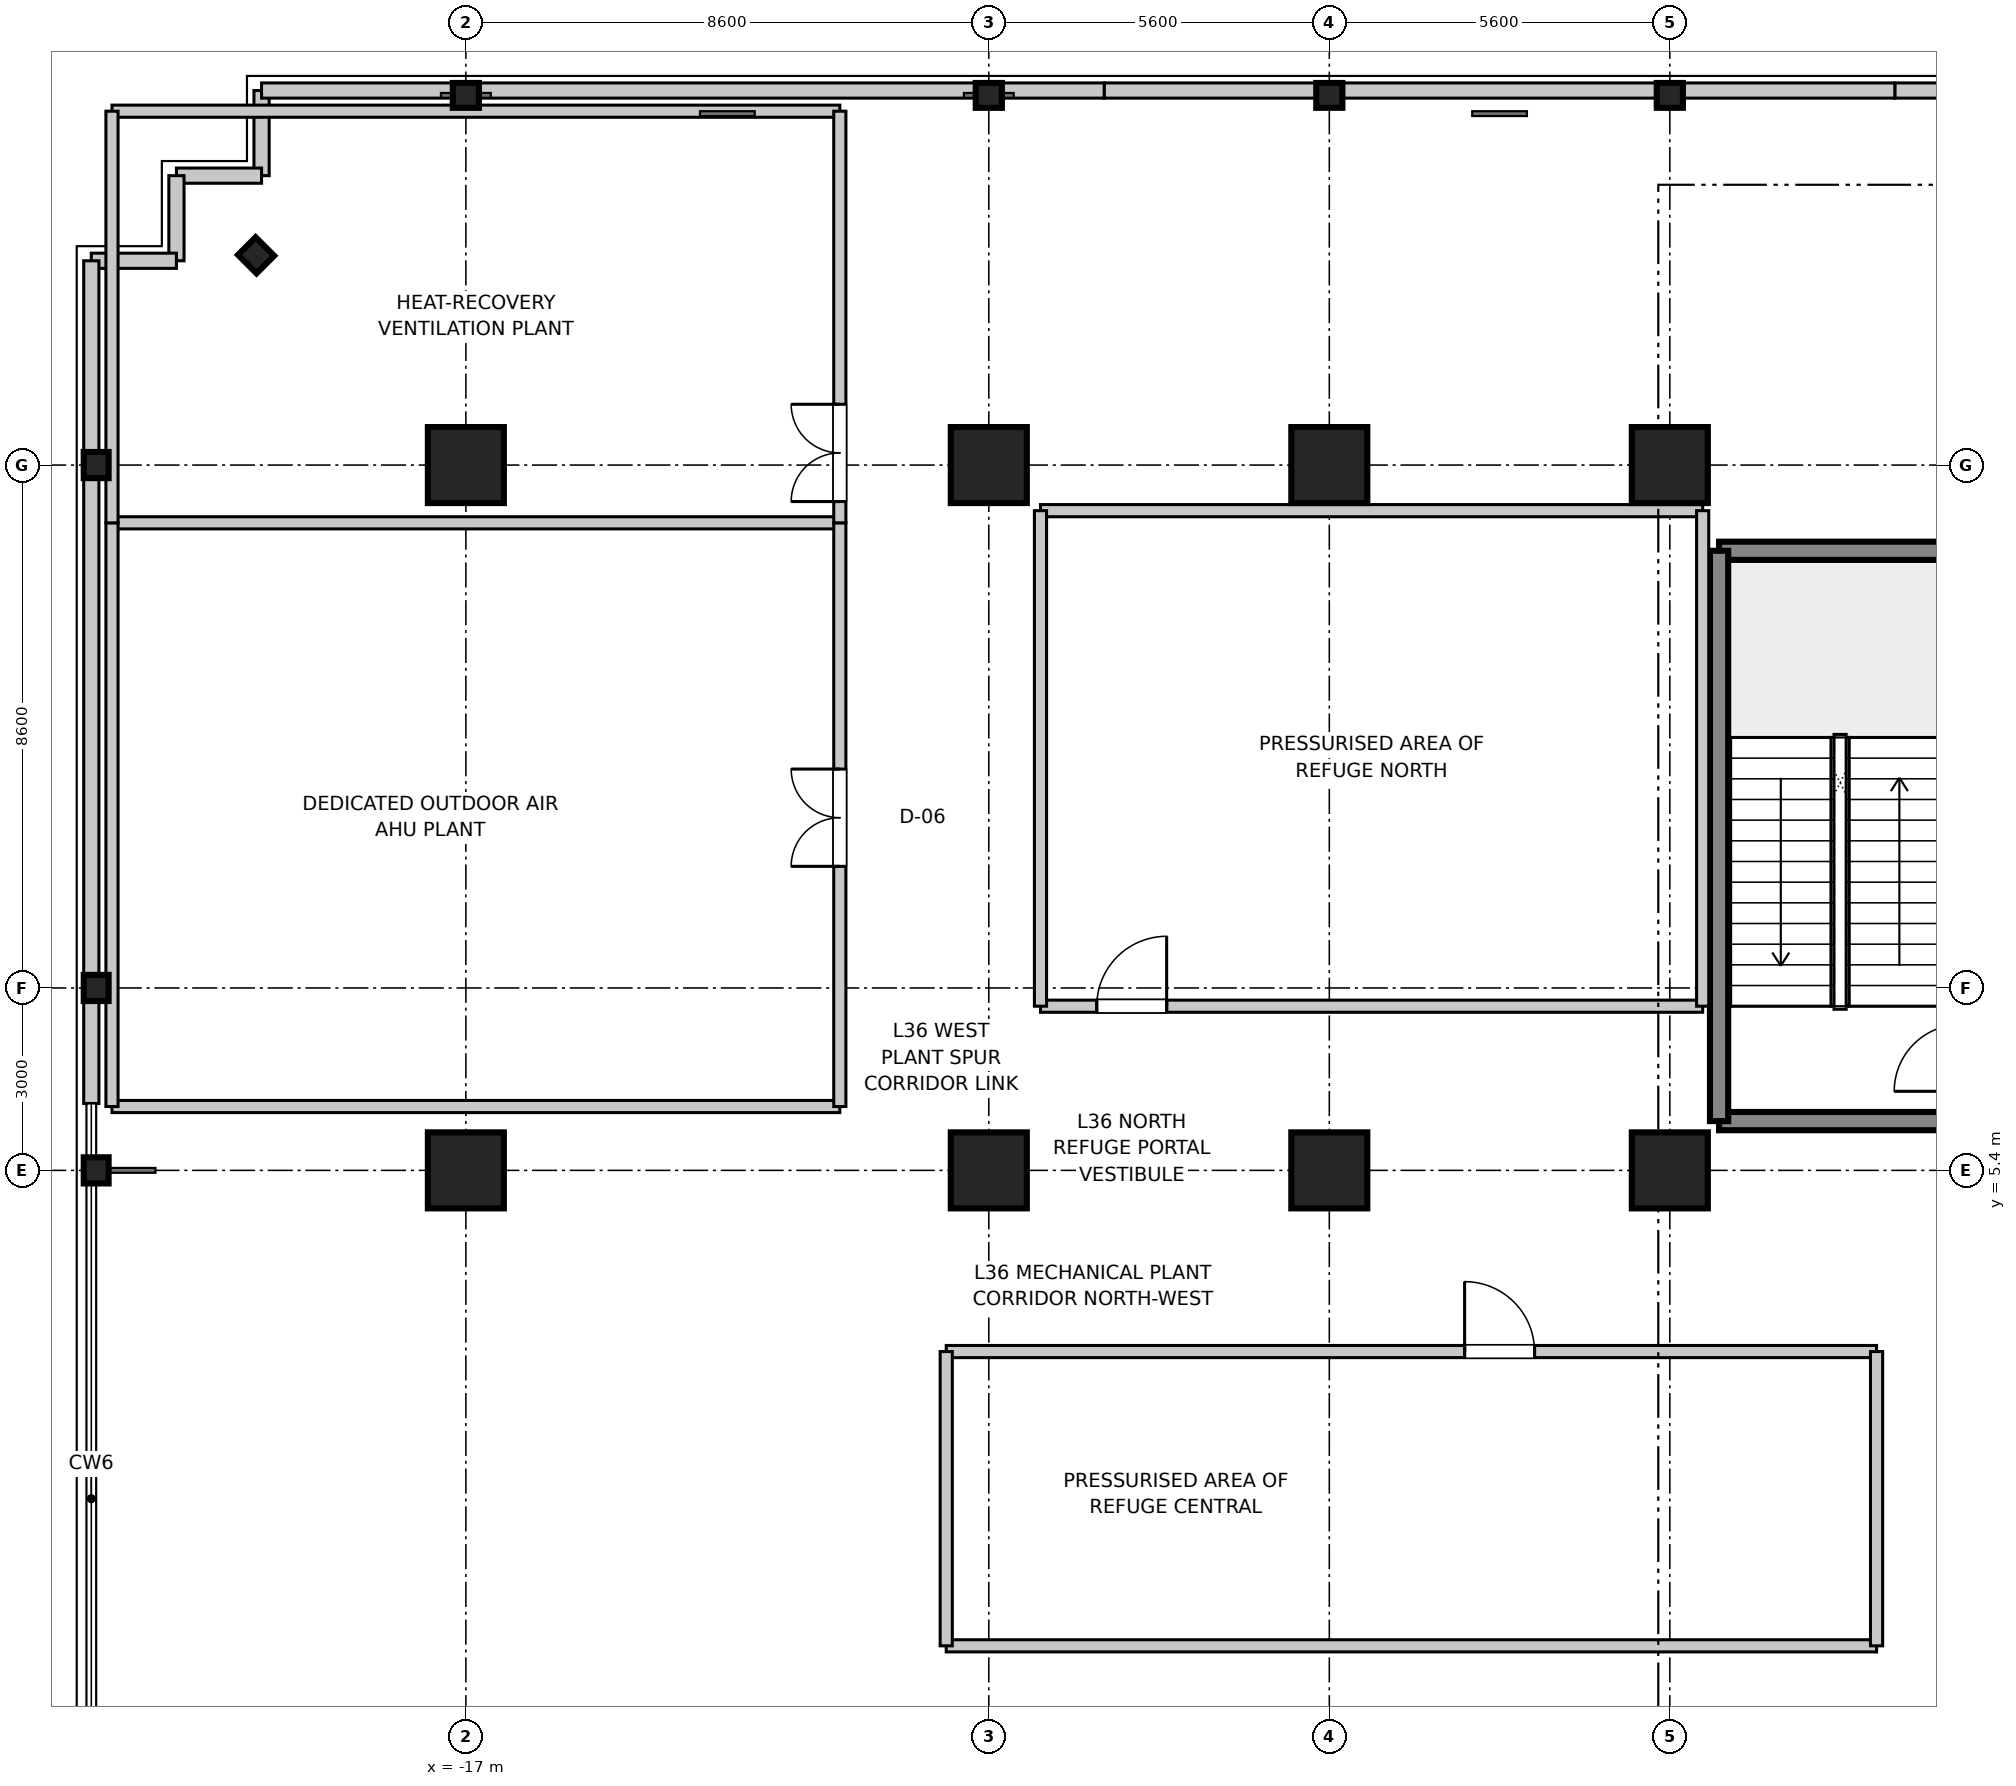
"""IFC4 building model, lengths in metres.
Left out: names, types, materials, properties, quantities, classifications, styles, units other than length and angle.
Written with IfcOpenShell. Run it as: python <this file> out.ifc"""

import sys

from ifc_helpers import new_model, si_unit, direction, frame, frame_2d, origin, origin_2d, place, context, subcontext, project, spatial, rectangle, i_section, extrude, source, transform, mapped, element, fill, save


model = new_model("IFC4")
c1 = context("Model", 3, precision=1e-05, world=origin(), true_north=direction((0.0, 1.0)))
c2 = subcontext(c1, "Body", "Model", "MODEL_VIEW")
j1 = project(units=[si_unit("LENGTHUNIT", "METRE"), si_unit("PLANEANGLEUNIT", "RADIAN")], contexts=[c1])
p1 = place(None, origin())
s1 = spatial("IfcSite", under=j1, at=p1, CompositionType="ELEMENT")
p2 = place(p1, origin())
s2 = spatial("IfcBuilding", under=s1, at=p2, CompositionType="ELEMENT")
p3 = place(p2, frame((0.0, 0.0, 144.2)))
s3 = spatial("IfcBuildingStorey", under=s2, at=p3, CompositionType="ELEMENT", Elevation=144.2)
m1 = source(origin(), c2, "Body", "SweptSolid", [
    extrude(rectangle(XDim=1.25, YDim=1.25, at=origin_2d()), origin(), (0.0, 0.0, 1.0), 4.755),
])
for number, where, z_axis, x_axis in (
    (1, (-17.0, 5.4, 0.0), (0.0, 0.0, 1.0), (1.0, 0.0, 0.0)),
    (2, (-17.0, 17.0, 0.0), (0.0, 0.0, 1.0), (1.0, 0.0, 0.0)),
    (3, (-8.4, 5.4, 0.0), (0.0, 0.0, 1.0), (1.0, 0.0, 0.0)),
    (4, (-8.4, 17.0, 0.0), (0.0, 0.0, 1.0), (1.0, 0.0, 0.0)),
    (5, (-2.8, 5.4, 0.0), (0.0, 0.0, 1.0), (1.0, 0.0, 0.0)),
    (6, (-2.8, 17.0, 0.0), (0.0, 0.0, 1.0), (1.0, 0.0, 0.0)),
    (7, (2.8, 5.4, 0.0), (0.0, 0.0, 1.0), (1.0, 0.0, 0.0)),
    (8, (2.8, 17.0, 0.0), (0.0, 0.0, 1.0), (1.0, 0.0, 0.0)),
):
    element("IfcColumn", number, at=place(p3, frame(where, z_axis=z_axis, x_axis=x_axis)), inside=s3, PredefinedType="COLUMN", context=c2, shape_type="MappedRepresentation", body=[
        mapped(m1, transform((0.0, 0.0, 0.0), scale=1.0)),
    ])
m2 = source(origin(), c2, "Body", "SweptSolid", [
    extrude(i_section(OverallWidth=0.409, OverallDepth=0.43, WebThickness=0.021, FlangeThickness=0.034, at=origin_2d()), origin(), (0.0, 0.0, 1.0), 4.694),
])
for number, where, z_axis, x_axis in (
    (9, (-23.08, 5.4, 0.0), (0.128, 0.0, 0.992), (0.0, 1.0, 0.0)),
    (10, (-23.08, 8.4, 0.0), (0.128, 0.0, 0.992), (0.0, 1.0, 0.0)),
    (11, (-23.08, 17.0, 0.0), (0.128, 0.0, 0.992), (0.0, 1.0, 0.0)),
    (12, (-17.0, 23.08, 0.0), (0.0, -0.128, 0.992), (0.0, 0.992, 0.128)),
    (13, (-8.4, 23.08, 0.0), (0.0, -0.128, 0.992), (0.0, 0.992, 0.128)),
    (14, (-2.8, 23.08, 0.0), (0.0, -0.128, 0.992), (0.0, 0.992, 0.128)),
    (15, (2.8, 23.08, 0.0), (0.0, -0.128, 0.992), (0.0, 0.992, 0.128)),
):
    element("IfcColumn", number, at=place(p3, frame(where, z_axis=z_axis, x_axis=x_axis)), inside=s3, PredefinedType="COLUMN", context=c2, shape_type="MappedRepresentation", body=[
        mapped(m2, transform((0.0, 0.0, 0.0), scale=1.0)),
    ])
m3 = source(origin(), c2, "Body", "SweptSolid", [
    extrude(i_section(OverallWidth=0.409, OverallDepth=0.43, WebThickness=0.021, FlangeThickness=0.034, at=origin_2d()), origin(), (0.0, 0.0, 1.0), 4.732),
])
p4 = place(p3, frame((-20.45, 20.45, 0.0), z_axis=(0.126773471153, -0.126773471153, 0.983797222005), x_axis=(0.008101388998, 0.991898611002, 0.126773471153)))
e16 = element("IfcColumn", 16, at=p4, inside=s3, PredefinedType="COLUMN", context=c2, shape_type="MappedRepresentation", body=[
    mapped(m3, transform((0.0, 0.0, 0.0), scale=1.0)),
])
m4 = source(origin(), c2, "Body", "SweptSolid", [
    extrude(rectangle(XDim=3.98, YDim=0.3, at=frame_2d((1.99, 0.0))), origin(), (0.0, 0.0, 1.0), 4.54),
])
for number, where, z_axis, x_axis in (
    (17, (3.61, 6.21, 0.0), (0.0, 0.0, 1.0), (1.0, 0.0, 0.0)),
    (18, (3.61, 15.59, 0.0), (0.0, 0.0, 1.0), (1.0, 0.0, 0.0)),
):
    element("IfcWall", number, at=place(p3, frame(where, z_axis=z_axis, x_axis=x_axis)), inside=s3, PredefinedType="SHEAR", context=c2, shape_type="MappedRepresentation", body=[
        mapped(m4, transform((0.0, 0.0, 0.0), scale=1.0)),
    ])
m5 = source(origin(), c2, "Body", "SweptSolid", [
    extrude(rectangle(XDim=9.38, YDim=0.3, at=frame_2d((4.69, 0.0))), origin(), (0.0, 0.0, 1.0), 4.54),
])
p5 = place(p3, frame((3.61, 6.21, 0.0), z_axis=(0.0, 0.0, 1.0), x_axis=(0.0, 1.0, 0.0)))
e19 = element("IfcWall", 19, at=p5, inside=s3, PredefinedType="SHEAR", context=c2, shape_type="MappedRepresentation", body=[
    mapped(m5, transform((0.0, 0.0, 0.0), scale=1.0)),
])
m6 = source(origin(), c2, "Body", "SweptSolid", [
    extrude(rectangle(XDim=1.4, YDim=0.25, at=frame_2d((0.7, 0.0))), origin(), (0.0, 0.0, 1.0), 4.54),
])
for number, where, z_axis, x_axis in (
    (20, (-20.36, 21.76, 0.0), (0.0, 0.0, 1.0), (0.0, 1.0, 0.0)),
    (21, (-21.76, 21.76, 0.0), (0.0, 0.0, 1.0), (1.0, 0.0, 0.0)),
    (22, (-21.76, 20.36, 0.0), (0.0, 0.0, 1.0), (0.0, 1.0, 0.0)),
    (23, (-23.16, 20.36, 0.0), (0.0, 0.0, 1.0), (1.0, 0.0, 0.0)),
):
    element("IfcWall", number, at=place(p3, frame(where, z_axis=z_axis, x_axis=x_axis)), inside=s3, PredefinedType="STANDARD", context=c2, shape_type="MappedRepresentation", body=[
        mapped(m6, transform((0.0, 0.0, 0.0), scale=1.0)),
    ])
m7 = source(origin(), c2, "Body", "SweptSolid", [
    extrude(rectangle(XDim=13.86, YDim=0.25, at=frame_2d((6.93, 0.0))), origin(), (0.0, 0.0, 1.0), 4.02),
])
for number, where, z_axis, x_axis in (
    (24, (-20.36, 23.16, 0.0), (0.0, 0.0, 1.0), (1.0, 0.0, 0.0)),
    (25, (6.5, 23.16, 0.0), (0.0, 0.0, 1.0), (1.0, 0.0, 0.0)),
):
    element("IfcWall", number, at=place(p3, frame(where, z_axis=z_axis, x_axis=x_axis)), inside=s3, PredefinedType="STANDARD", context=c2, shape_type="MappedRepresentation", body=[
        mapped(m7, transform((0.0, 0.0, 0.0), scale=1.0)),
    ])
m8 = source(origin(), c2, "Body", "SweptSolid", [
    extrude(rectangle(XDim=13.0, YDim=0.25, at=frame_2d((6.5, 0.0))), origin(), (0.0, 0.0, 1.0), 4.02),
])
p6 = place(p3, frame((-6.5, 23.16, 0.0), z_axis=(0.0, 0.0, 1.0), x_axis=(1.0, 0.0, 0.0)))
e26 = element("IfcWall", 26, at=p6, inside=s3, PredefinedType="STANDARD", context=c2, shape_type="MappedRepresentation", body=[
    mapped(m8, transform((0.0, 0.0, 0.0), scale=1.0)),
])
p7 = place(p3, frame((-23.16, 6.5, 0.0), z_axis=(0.0, 0.0, 1.0), x_axis=(0.0, 1.0, 0.0)))
e27 = element("IfcWall", 27, at=p7, inside=s3, PredefinedType="STANDARD", context=c2, shape_type="MappedRepresentation", body=[
    mapped(m7, transform((0.0, 0.0, 0.0), scale=1.0)),
])
m9 = source(origin(), c2, "Body", "SweptSolid", [
    extrude(rectangle(XDim=10.89, YDim=0.2, at=frame_2d((5.445, 0.0))), origin(), (0.0, 0.0, 1.0), 3.4),
])
p8 = place(p3, frame((-7.55, 8.1, 0.0), z_axis=(0.0, 0.0, 1.0), x_axis=(1.0, 0.0, 0.0)))
e28 = element("IfcWall", 28, at=p8, inside=s3, PredefinedType="PARTITIONING", context=c2, shape_type="MappedRepresentation", body=[
    mapped(m9, transform((0.0, 0.0, 0.0), scale=1.0)),
])
p9 = place(p8, frame((0.925, 0.0, 0.0)))
e29 = element("IfcOpeningElement", 29, at=p9, cuts=e28, PredefinedType="OPENING", context=c2, shape_type="SweptSolid", body=[
    extrude(rectangle(XDim=1.15, YDim=2.15, at=frame_2d((0.575, 1.075))), frame((0.0, 0.11, 0.0), z_axis=(0.0, -1.0, 0.0), x_axis=(1.0, 0.0, 0.0)), (0.0, 0.0, 1.0), 0.22),
])
p10 = place(p3, frame((-7.55, 16.25, 0.0), z_axis=(0.0, 0.0, 1.0), x_axis=(1.0, 0.0, 0.0)))
e30 = element("IfcWall", 30, at=p10, inside=s3, PredefinedType="PARTITIONING", context=c2, shape_type="MappedRepresentation", body=[
    mapped(m9, transform((0.0, 0.0, 0.0), scale=1.0)),
])
m10 = source(origin(), c2, "Body", "SweptSolid", [
    extrude(rectangle(XDim=8.15, YDim=0.2, at=frame_2d((4.075, 0.0))), origin(), (0.0, 0.0, 1.0), 3.4),
])
for number, where, z_axis, x_axis in (
    (31, (-7.55, 8.1, 0.0), (0.0, 0.0, 1.0), (0.0, 1.0, 0.0)),
    (32, (3.34, 8.1, 0.0), (0.0, 0.0, 1.0), (0.0, 1.0, 0.0)),
):
    element("IfcWall", number, at=place(p3, frame(where, z_axis=z_axis, x_axis=x_axis)), inside=s3, PredefinedType="PARTITIONING", context=c2, shape_type="MappedRepresentation", body=[
        mapped(m10, transform((0.0, 0.0, 0.0), scale=1.0)),
    ])
m11 = source(origin(), c2, "Body", "SweptSolid", [
    extrude(rectangle(XDim=15.3, YDim=0.2, at=frame_2d((7.65, 0.0))), origin(), (0.0, 0.0, 1.0), 3.4),
])
p11 = place(p3, frame((-9.1, -2.42, 0.0), z_axis=(0.0, 0.0, 1.0), x_axis=(1.0, 0.0, 0.0)))
e33 = element("IfcWall", 33, at=p11, inside=s3, PredefinedType="PARTITIONING", context=c2, shape_type="MappedRepresentation", body=[
    mapped(m11, transform((0.0, 0.0, 0.0), scale=1.0)),
])
p12 = place(p3, frame((-9.1, 2.42, 0.0), z_axis=(0.0, 0.0, 1.0), x_axis=(1.0, 0.0, 0.0)))
e34 = element("IfcWall", 34, at=p12, inside=s3, PredefinedType="PARTITIONING", context=c2, shape_type="MappedRepresentation", body=[
    mapped(m11, transform((0.0, 0.0, 0.0), scale=1.0)),
])
p13 = place(p12, frame((8.525, 0.0, 0.0)))
e35 = element("IfcOpeningElement", 35, at=p13, cuts=e34, PredefinedType="OPENING", context=c2, shape_type="SweptSolid", body=[
    extrude(rectangle(XDim=1.15, YDim=2.15, at=frame_2d((0.575, 1.075))), frame((0.0, 0.11, 0.0), z_axis=(0.0, -1.0, 0.0), x_axis=(1.0, 0.0, 0.0)), (0.0, 0.0, 1.0), 0.22),
])
m12 = source(origin(), c2, "Body", "SweptSolid", [
    extrude(rectangle(XDim=4.84, YDim=0.2, at=frame_2d((2.42, 0.0))), origin(), (0.0, 0.0, 1.0), 3.4),
])
for number, where, z_axis, x_axis in (
    (36, (-9.1, -2.42, 0.0), (0.0, 0.0, 1.0), (0.0, 1.0, 0.0)),
    (37, (6.2, -2.42, 0.0), (0.0, 0.0, 1.0), (0.0, 1.0, 0.0)),
):
    element("IfcWall", number, at=place(p3, frame(where, z_axis=z_axis, x_axis=x_axis)), inside=s3, PredefinedType="PARTITIONING", context=c2, shape_type="MappedRepresentation", body=[
        mapped(m12, transform((0.0, 0.0, 0.0), scale=1.0)),
    ])
m13 = source(origin(), c2, "Body", "SweptSolid", [
    extrude(rectangle(XDim=11.97, YDim=0.2, at=frame_2d((5.985, 0.0))), origin(), (0.0, 0.0, 1.0), 3.4),
])
for number, where, z_axis, x_axis in (
    (38, (-22.82, 6.45, 0.0), (0.0, 0.0, 1.0), (1.0, 0.0, 0.0)),
    (39, (-22.82, 16.05, 0.0), (0.0, 0.0, 1.0), (1.0, 0.0, 0.0)),
):
    element("IfcWall", number, at=place(p3, frame(where, z_axis=z_axis, x_axis=x_axis)), inside=s3, PredefinedType="PARTITIONING", context=c2, shape_type="MappedRepresentation", body=[
        mapped(m13, transform((0.0, 0.0, 0.0), scale=1.0)),
    ])
m14 = source(origin(), c2, "Body", "SweptSolid", [
    extrude(rectangle(XDim=9.6, YDim=0.2, at=frame_2d((4.8, 0.0))), origin(), (0.0, 0.0, 1.0), 3.4),
])
p14 = place(p3, frame((-22.82, 6.45, 0.0), z_axis=(0.0, 0.0, 1.0), x_axis=(0.0, 1.0, 0.0)))
e40 = element("IfcWall", 40, at=p14, inside=s3, PredefinedType="PARTITIONING", context=c2, shape_type="MappedRepresentation", body=[
    mapped(m14, transform((0.0, 0.0, 0.0), scale=1.0)),
])
p15 = place(p3, frame((-10.85, 6.45, 0.0), z_axis=(0.0, 0.0, 1.0), x_axis=(0.0, 1.0, 0.0)))
e41 = element("IfcWall", 41, at=p15, inside=s3, PredefinedType="PARTITIONING", context=c2, shape_type="MappedRepresentation", body=[
    mapped(m14, transform((0.0, 0.0, 0.0), scale=1.0)),
])
p16 = place(p15, frame((3.95, 0.0, 0.0)))
e42 = element("IfcOpeningElement", 42, at=p16, cuts=e41, PredefinedType="OPENING", context=c2, shape_type="SweptSolid", body=[
    extrude(rectangle(XDim=1.6, YDim=2.15, at=frame_2d((0.8, 1.075))), frame((0.0, 0.11, 0.0), z_axis=(0.0, -1.0, 0.0), x_axis=(1.0, 0.0, 0.0)), (0.0, 0.0, 1.0), 0.22),
])
p17 = place(p3, frame((-22.82, 22.82, 0.0), z_axis=(0.0, 0.0, 1.0), x_axis=(1.0, 0.0, 0.0)))
e43 = element("IfcWall", 43, at=p17, inside=s3, PredefinedType="PARTITIONING", context=c2, shape_type="MappedRepresentation", body=[
    mapped(m13, transform((0.0, 0.0, 0.0), scale=1.0)),
])
m15 = source(origin(), c2, "Body", "SweptSolid", [
    extrude(rectangle(XDim=6.77, YDim=0.2, at=frame_2d((3.385, 0.0))), origin(), (0.0, 0.0, 1.0), 3.4),
])
p18 = place(p3, frame((-22.82, 16.05, 0.0), z_axis=(0.0, 0.0, 1.0), x_axis=(0.0, 1.0, 0.0)))
e44 = element("IfcWall", 44, at=p18, inside=s3, PredefinedType="PARTITIONING", context=c2, shape_type="MappedRepresentation", body=[
    mapped(m15, transform((0.0, 0.0, 0.0), scale=1.0)),
])
p19 = place(p3, frame((-10.85, 16.05, 0.0), z_axis=(0.0, 0.0, 1.0), x_axis=(0.0, 1.0, 0.0)))
e45 = element("IfcWall", 45, at=p19, inside=s3, PredefinedType="PARTITIONING", context=c2, shape_type="MappedRepresentation", body=[
    mapped(m15, transform((0.0, 0.0, 0.0), scale=1.0)),
])
p20 = place(p19, frame((0.35, 0.0, 0.0)))
e46 = element("IfcOpeningElement", 46, at=p20, cuts=e45, PredefinedType="OPENING", context=c2, shape_type="SweptSolid", body=[
    extrude(rectangle(XDim=1.6, YDim=2.15, at=frame_2d((0.8, 1.075))), frame((0.0, 0.11, 0.0), z_axis=(0.0, -1.0, 0.0), x_axis=(1.0, 0.0, 0.0)), (0.0, 0.0, 1.0), 0.22),
])
m16 = source(origin(), c2, "Body", "SweptSolid", [
    extrude(rectangle(XDim=1.15, YDim=2.15, at=frame_2d((0.575, 1.075))), frame((0.0, 0.025, 0.0), z_axis=(0.0, -1.0, 0.0), x_axis=(1.0, 0.0, 0.0)), (0.0, 0.0, 1.0), 0.05),
])
p21 = place(p9, origin())
e47 = element("IfcDoor", 47, at=p21, inside=s3, OperationType="SINGLE_SWING_RIGHT", PredefinedType="DOOR", context=c2, shape_type="MappedRepresentation", body=[
    mapped(m16, transform((0.0, 0.0, 0.0), scale=1.0)),
])
fill(e29, e47)
p22 = place(p13, frame((1.15, 0.0, 0.0), z_axis=(0.0, 0.0, 1.0), x_axis=(-1.0, 0.0, 0.0)))
e48 = element("IfcDoor", 48, at=p22, inside=s3, OperationType="SINGLE_SWING_LEFT", PredefinedType="DOOR", context=c2, shape_type="MappedRepresentation", body=[
    mapped(m16, transform((0.0, 0.0, 0.0), scale=1.0)),
])
fill(e35, e48)
m17 = source(origin(), c2, "Body", "SweptSolid", [
    extrude(rectangle(XDim=1.6, YDim=2.15, at=frame_2d((0.8, 1.075))), frame((0.0, 0.025, 0.0), z_axis=(0.0, -1.0, 0.0), x_axis=(1.0, 0.0, 0.0)), (0.0, 0.0, 1.0), 0.05),
])
p23 = place(p16, origin())
e49 = element("IfcDoor", 49, at=p23, inside=s3, OperationType="DOUBLE_DOOR_SINGLE_SWING", PredefinedType="DOOR", context=c2, shape_type="MappedRepresentation", body=[
    mapped(m17, transform((0.0, 0.0, 0.0), scale=1.0)),
])
fill(e42, e49)
p24 = place(p20, origin())
e50 = element("IfcDoor", 50, at=p24, inside=s3, OperationType="DOUBLE_DOOR_SINGLE_SWING", PredefinedType="DOOR", context=c2, shape_type="MappedRepresentation", body=[
    mapped(m17, transform((0.0, 0.0, 0.0), scale=1.0)),
])
fill(e46, e50)
save(model, sys.argv[1])
